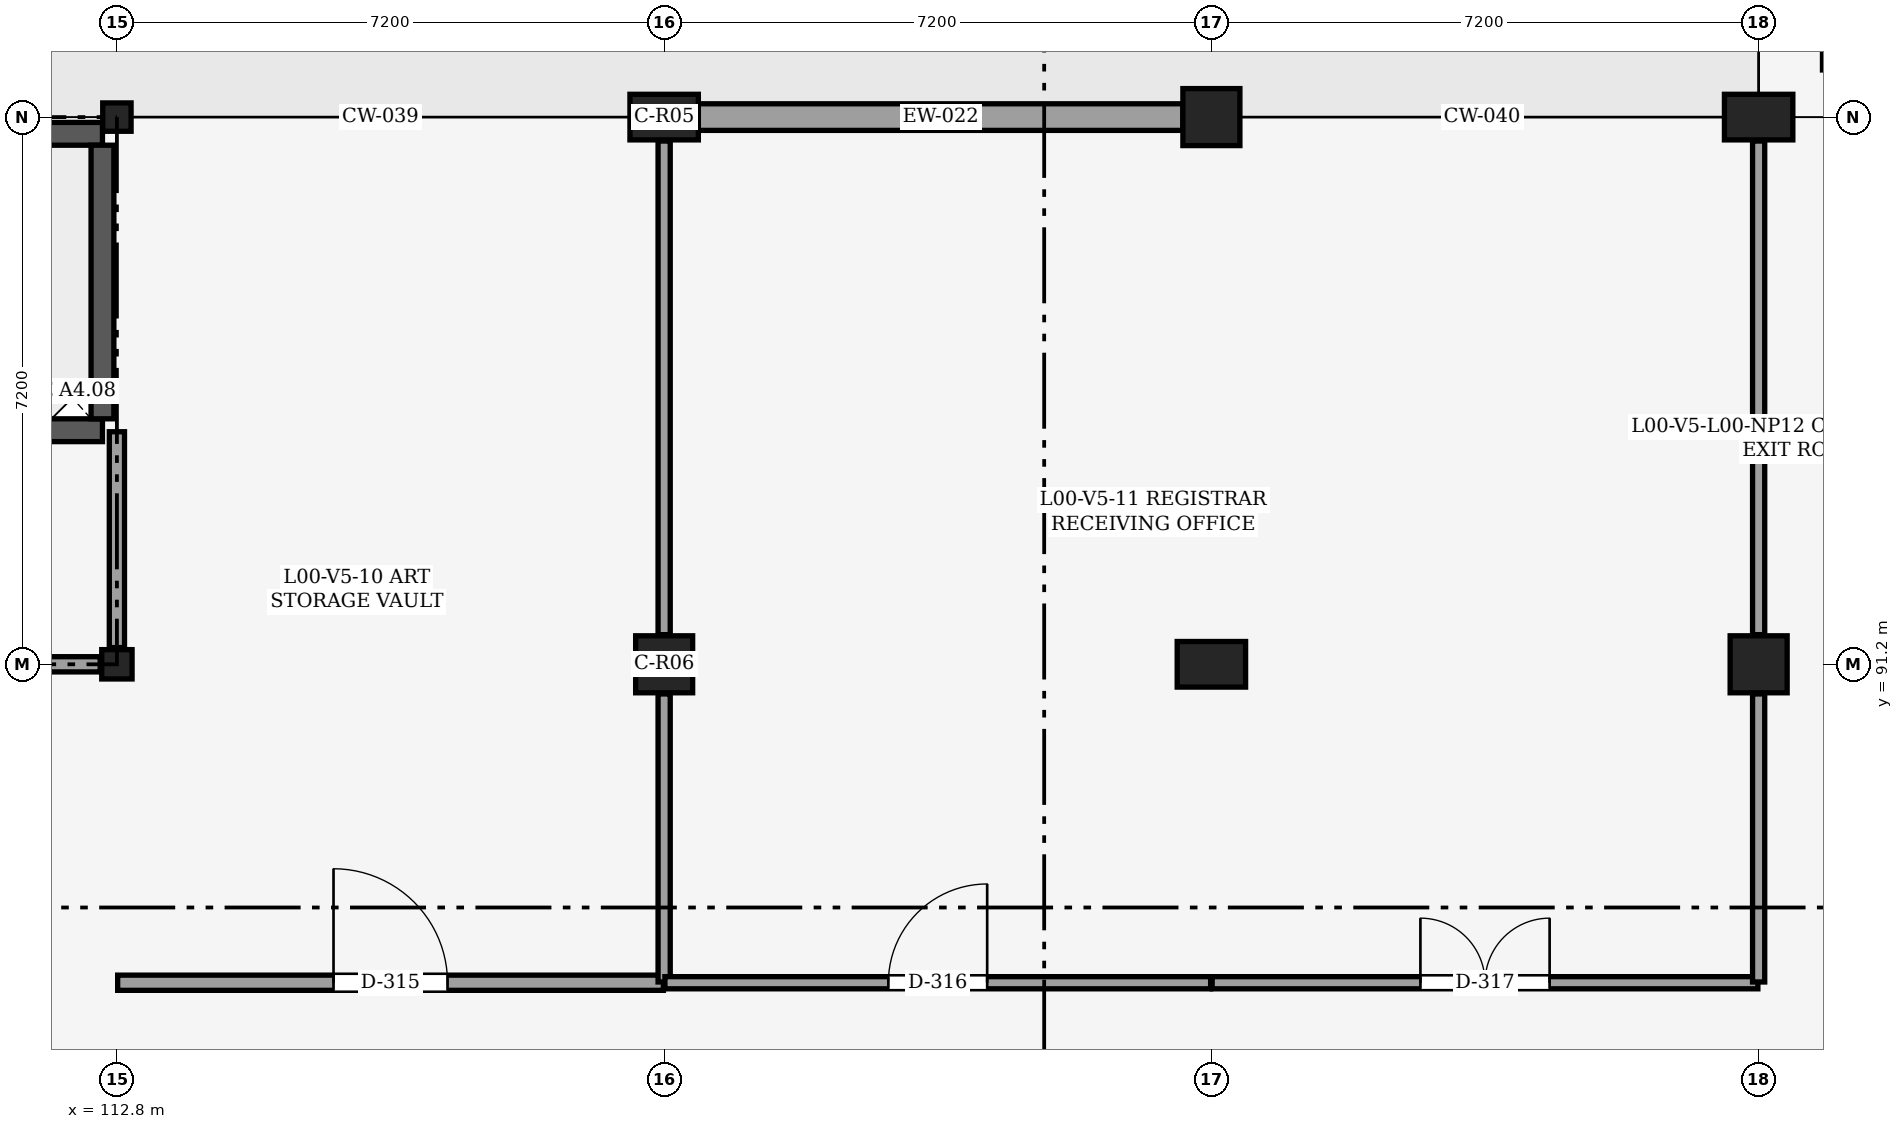
"""IFC4 building model, lengths in metres.
Left out: names, types, materials, properties, quantities, classifications, styles, units other than length and angle.
Written with IfcOpenShell. Run it as: python <this file> out.ifc"""

import sys

from ifc_helpers import new_model, si_unit, direction, frame, frame_2d, origin, origin_2d, place, context, subcontext, project, spatial, rectangle, circle, i_section, extrude, element, fill, save


model = new_model("IFC4")
c1 = context("Model", 3, precision=1e-05, world=origin(), true_north=direction((0.0, 1.0)))
c2 = subcontext(c1, "Body", "Model", "MODEL_VIEW")
j1 = project(units=[si_unit("LENGTHUNIT", "METRE"), si_unit("PLANEANGLEUNIT", "RADIAN")], contexts=[c1])
p1 = place(None, origin())
s1 = spatial("IfcSite", under=j1, at=p1, CompositionType="ELEMENT")
p2 = place(p1, origin())
s2 = spatial("IfcBuilding", under=s1, at=p2, CompositionType="ELEMENT")
p3 = place(p2, origin())
s3 = spatial("IfcBuildingStorey", under=s2, at=p3, CompositionType="ELEMENT", Elevation=0.0)
p4 = place(p3, frame((112.8, 91.2, 0.0), z_axis=(0.0, 0.0, 1.0), x_axis=(1.0, 0.0, 0.0)))
e1 = element("IfcColumn", 1, at=p4, inside=s3, PredefinedType="COLUMN", context=c2, shape_type="SweptSolid", body=[
    extrude(i_section(OverallWidth=0.399, OverallDepth=0.386, WebThickness=0.021, FlangeThickness=0.033, FilletRadius=0.025, at=origin_2d()), origin(), (0.0, 0.0, 1.0), 5.4),
])
p5 = place(p3, frame((112.8, 98.4, 0.0), z_axis=(0.0, 0.0, 1.0), x_axis=(1.0, 0.0, 0.0)))
e2 = element("IfcColumn", 2, at=p5, inside=s3, PredefinedType="COLUMN", context=c2, shape_type="SweptSolid", body=[
    extrude(i_section(OverallWidth=0.373, OverallDepth=0.373, WebThickness=0.016, FlangeThickness=0.026, FilletRadius=0.025, at=origin_2d()), origin(), (0.0, 0.0, 1.0), 5.4),
])
p6 = place(p3, frame((120.0, 91.2, 0.0), z_axis=(0.0, 0.0, 1.0), x_axis=(1.0, 0.0, 0.0)))
e3 = element("IfcColumn", 3, at=p6, inside=s3, PredefinedType="COLUMN", context=c2, shape_type="SweptSolid", body=[
    extrude(circle(Radius=0.375, at=origin_2d()), origin(), (0.0, 0.0, 1.0), 5.4),
])
for number, where, z_axis, x_axis in (
    (4, (120.0, 98.4, 0.0), (0.0, 0.0, 1.0), (1.0, 0.0, 0.0)),
    (5, (127.2, 91.2, 0.0), (0.0, 0.0, 1.0), (1.0, 0.0, 0.0)),
):
    element("IfcColumn", number, at=place(p3, frame(where, z_axis=z_axis, x_axis=x_axis)), inside=s3, PredefinedType="COLUMN", context=c2, shape_type="SweptSolid", body=[
        extrude(rectangle(XDim=0.9, YDim=0.6, at=origin_2d()), origin(), (0.0, 0.0, 1.0), 5.4),
    ])
for number, where, z_axis, x_axis in (
    (6, (127.2, 98.4, 0.0), (0.0, 0.0, 1.0), (1.0, 0.0, 0.0)),
    (7, (134.4, 91.2, 0.0), (0.0, 0.0, 1.0), (1.0, 0.0, 0.0)),
):
    element("IfcColumn", number, at=place(p3, frame(where, z_axis=z_axis, x_axis=x_axis)), inside=s3, PredefinedType="COLUMN", context=c2, shape_type="SweptSolid", body=[
        extrude(circle(Radius=0.375, at=origin_2d()), origin(), (0.0, 0.0, 1.0), 5.4),
    ])
p7 = place(p3, frame((134.4, 98.4, 0.0), z_axis=(0.0, 0.0, 1.0), x_axis=(1.0, 0.0, 0.0)))
e8 = element("IfcColumn", 8, at=p7, inside=s3, PredefinedType="COLUMN", context=c2, shape_type="SweptSolid", body=[
    extrude(rectangle(XDim=0.9, YDim=0.6, at=origin_2d()), origin(), (0.0, 0.0, 1.0), 5.4),
])
p8 = place(p3, frame((120.45, 98.4, 0.0), z_axis=(0.0, 0.0, 1.0), x_axis=(1.0, 0.0, 0.0)))
e9 = element("IfcWall", 9, at=p8, inside=s3, PredefinedType="SOLIDWALL", context=c2, shape_type="SweptSolid", body=[
    extrude(rectangle(XDim=6.375, YDim=0.35, at=frame_2d((3.188, 0.0))), origin(), (0.0, 0.0, 1.0), 4.724),
])
p9 = place(p3, frame((104.59, 94.28, 0.0), z_axis=(0.0, 0.0, 1.0), x_axis=(1.0, 0.0, 0.0)))
e10 = element("IfcWall", 10, at=p9, inside=s3, PredefinedType="SHEAR", context=c2, shape_type="SweptSolid", body=[
    extrude(rectangle(XDim=8.02, YDim=0.3, at=frame_2d((4.01, 0.0))), origin(), (0.0, 0.0, 1.0), 5.16),
])
p10 = place(p9, frame((0.45, 0.0, 0.0)))
e11 = element("IfcOpeningElement", 11, at=p10, cuts=e10, PredefinedType="OPENING", context=c2, shape_type="SweptSolid", body=[
    extrude(rectangle(XDim=1.1, YDim=2.15, at=frame_2d((0.55, 1.075))), frame((0.0, 0.16, 0.0), z_axis=(0.0, -1.0, 0.0), x_axis=(1.0, 0.0, 0.0)), (0.0, 0.0, 1.0), 0.321),
])
p11 = place(p3, frame((104.59, 98.18, 0.0), z_axis=(0.0, 0.0, 1.0), x_axis=(1.0, 0.0, 0.0)))
e12 = element("IfcWall", 12, at=p11, inside=s3, PredefinedType="SHEAR", context=c2, shape_type="SweptSolid", body=[
    extrude(rectangle(XDim=8.02, YDim=0.3, at=frame_2d((4.01, 0.0))), origin(), (0.0, 0.0, 1.0), 5.16),
])
p12 = place(p3, frame((112.61, 94.43, 0.0), z_axis=(0.0, 0.0, 1.0), x_axis=(0.0, 1.0, 0.0)))
e13 = element("IfcWall", 13, at=p12, inside=s3, PredefinedType="SHEAR", context=c2, shape_type="SweptSolid", body=[
    extrude(rectangle(XDim=3.6, YDim=0.3, at=frame_2d((1.8, 0.0))), origin(), (0.0, 0.0, 1.0), 5.16),
])
p13 = place(p3, frame((112.8, 91.42, 0.0), z_axis=(0.0, 0.0, 1.0), x_axis=(0.0, 1.0, 0.0)))
e14 = element("IfcWall", 14, at=p13, inside=s3, PredefinedType="PARTITIONING", context=c2, shape_type="SweptSolid", body=[
    extrude(rectangle(XDim=2.84, YDim=0.2, at=frame_2d((1.42, 0.0))), origin(), (0.0, 0.0, 1.0), 4.468),
])
p14 = place(p3, frame((104.62, 91.2, 0.0), z_axis=(0.0, 0.0, 1.0), x_axis=(1.0, 0.0, 0.0)))
e15 = element("IfcWall", 15, at=p14, inside=s3, PredefinedType="PARTITIONING", context=c2, shape_type="SweptSolid", body=[
    extrude(rectangle(XDim=7.96, YDim=0.2, at=frame_2d((3.98, 0.0))), origin(), (0.0, 0.0, 1.0), 4.318),
])
p15 = place(p14, frame((3.255, 0.0, 0.0)))
e16 = element("IfcOpeningElement", 16, at=p15, cuts=e15, PredefinedType="OPENING", context=c2, shape_type="SweptSolid", body=[
    extrude(rectangle(XDim=1.45, YDim=2.2, at=frame_2d((0.725, 1.1))), frame((0.0, 0.11, 0.0), z_axis=(0.0, -1.0, 0.0), x_axis=(1.0, 0.0, 0.0)), (0.0, 0.0, 1.0), 0.22),
])
p16 = place(p3, frame((135.3, 99.02, 0.0), z_axis=(0.0, 0.0, 1.0), x_axis=(0.0, 1.0, 0.0)))
e17 = element("IfcWall", 17, at=p16, inside=s3, PredefinedType="PARTITIONING", context=c2, shape_type="SweptSolid", body=[
    extrude(rectangle(XDim=1.04, YDim=0.12, at=frame_2d((0.52, 0.0))), origin(), (0.0, 0.0, 1.0), 5.16),
])
p17 = place(p3, frame((112.81, 87.01, 0.0), z_axis=(0.0, 0.0, 1.0), x_axis=(1.0, 0.0, 0.0)))
e18 = element("IfcWall", 18, at=p17, inside=s3, PredefinedType="PARTITIONING", context=c2, shape_type="SweptSolid", body=[
    extrude(rectangle(XDim=7.18, YDim=0.2, at=frame_2d((3.59, 0.0))), origin(), (0.0, 0.0, 1.0), 5.14),
])
p18 = place(p17, frame((2.84, 0.0, 0.0)))
e19 = element("IfcOpeningElement", 19, at=p18, cuts=e18, PredefinedType="OPENING", context=c2, shape_type="SweptSolid", body=[
    extrude(rectangle(XDim=1.5, YDim=2.2, at=frame_2d((0.75, 1.1))), frame((0.0, 0.11, 0.0), z_axis=(0.0, -1.0, 0.0), x_axis=(1.0, 0.0, 0.0)), (0.0, 0.0, 1.0), 0.22),
])
p19 = place(p3, frame((120.0, 87.02, 0.0), z_axis=(0.0, 0.0, 1.0), x_axis=(0.0, 1.0, 0.0)))
e20 = element("IfcWall", 20, at=p19, inside=s3, PredefinedType="PARTITIONING", context=c2, shape_type="SweptSolid", body=[
    extrude(rectangle(XDim=3.79, YDim=0.16, at=frame_2d((1.895, 0.0))), origin(), (0.0, 0.0, 1.0), 4.468),
])
p20 = place(p3, frame((120.0, 91.59, 0.0), z_axis=(0.0, 0.0, 1.0), x_axis=(0.0, 1.0, 0.0)))
e21 = element("IfcWall", 21, at=p20, inside=s3, PredefinedType="PARTITIONING", context=c2, shape_type="SweptSolid", body=[
    extrude(rectangle(XDim=6.495, YDim=0.16, at=frame_2d((3.248, 0.0))), origin(), (0.0, 0.0, 1.0), 4.473),
])
p21 = place(p3, frame((120.01, 87.01, 0.0), z_axis=(0.0, 0.0, 1.0), x_axis=(1.0, 0.0, 0.0)))
e22 = element("IfcWall", 22, at=p21, inside=s3, PredefinedType="PARTITIONING", context=c2, shape_type="SweptSolid", body=[
    extrude(rectangle(XDim=7.18, YDim=0.16, at=frame_2d((3.59, 0.0))), origin(), (0.0, 0.0, 1.0), 5.14),
])
p22 = place(p21, frame((2.94, 0.0, 0.0)))
e23 = element("IfcOpeningElement", 23, at=p22, cuts=e22, PredefinedType="OPENING", context=c2, shape_type="SweptSolid", body=[
    extrude(rectangle(XDim=1.3, YDim=2.2, at=frame_2d((0.65, 1.1))), frame((0.0, 0.09, 0.0), z_axis=(0.0, -1.0, 0.0), x_axis=(1.0, 0.0, 0.0)), (0.0, 0.0, 1.0), 0.18),
])
p23 = place(p3, frame((127.21, 87.01, 0.0), z_axis=(0.0, 0.0, 1.0), x_axis=(1.0, 0.0, 0.0)))
e24 = element("IfcWall", 24, at=p23, inside=s3, PredefinedType="PARTITIONING", context=c2, shape_type="SweptSolid", body=[
    extrude(rectangle(XDim=7.18, YDim=0.16, at=frame_2d((3.59, 0.0))), origin(), (0.0, 0.0, 1.0), 5.14),
])
p24 = place(p23, frame((2.74, 0.0, 0.0)))
e25 = element("IfcOpeningElement", 25, at=p24, cuts=e24, PredefinedType="OPENING", context=c2, shape_type="SweptSolid", body=[
    extrude(rectangle(XDim=1.7, YDim=2.4, at=frame_2d((0.85, 1.2))), frame((0.0, 0.09, 0.0), z_axis=(0.0, -1.0, 0.0), x_axis=(1.0, 0.0, 0.0)), (0.0, 0.0, 1.0), 0.18),
])
p25 = place(p3, frame((134.4, 87.02, 0.0), z_axis=(0.0, 0.0, 1.0), x_axis=(0.0, 1.0, 0.0)))
e26 = element("IfcWall", 26, at=p25, inside=s3, PredefinedType="PARTITIONING", context=c2, shape_type="SweptSolid", body=[
    extrude(rectangle(XDim=3.79, YDim=0.16, at=frame_2d((1.895, 0.0))), origin(), (0.0, 0.0, 1.0), 4.38),
])
p26 = place(p3, frame((134.4, 91.59, 0.0), z_axis=(0.0, 0.0, 1.0), x_axis=(0.0, 1.0, 0.0)))
e27 = element("IfcWall", 27, at=p26, inside=s3, PredefinedType="PARTITIONING", context=c2, shape_type="SweptSolid", body=[
    extrude(rectangle(XDim=6.495, YDim=0.16, at=frame_2d((3.248, 0.0))), origin(), (0.0, 0.0, 1.0), 4.23),
])
p27 = place(p18, origin())
e28 = element("IfcDoor", 28, at=p27, inside=s3, OperationType="SINGLE_SWING_LEFT", PredefinedType="DOOR", context=c2, shape_type="SweptSolid", body=[
    extrude(rectangle(XDim=1.5, YDim=2.2, at=frame_2d((0.75, 1.1))), frame((0.0, 0.025, 0.0), z_axis=(0.0, -1.0, 0.0), x_axis=(1.0, 0.0, 0.0)), (0.0, 0.0, 1.0), 0.05),
])
fill(e19, e28)
p28 = place(p22, origin())
e29 = element("IfcDoor", 29, at=p28, inside=s3, OperationType="SINGLE_SWING_RIGHT", PredefinedType="DOOR", context=c2, shape_type="SweptSolid", body=[
    extrude(rectangle(XDim=1.3, YDim=2.2, at=frame_2d((0.65, 1.1))), frame((0.0, 0.025, 0.0), z_axis=(0.0, -1.0, 0.0), x_axis=(1.0, 0.0, 0.0)), (0.0, 0.0, 1.0), 0.05),
])
fill(e23, e29)
p29 = place(p24, origin())
e30 = element("IfcDoor", 30, at=p29, inside=s3, OperationType="DOUBLE_DOOR_SINGLE_SWING", PredefinedType="DOOR", context=c2, shape_type="SweptSolid", body=[
    extrude(rectangle(XDim=1.7, YDim=2.4, at=frame_2d((0.85, 1.2))), frame((0.0, 0.025, 0.0), z_axis=(0.0, -1.0, 0.0), x_axis=(1.0, 0.0, 0.0)), (0.0, 0.0, 1.0), 0.05),
])
fill(e25, e30)
save(model, sys.argv[1])
